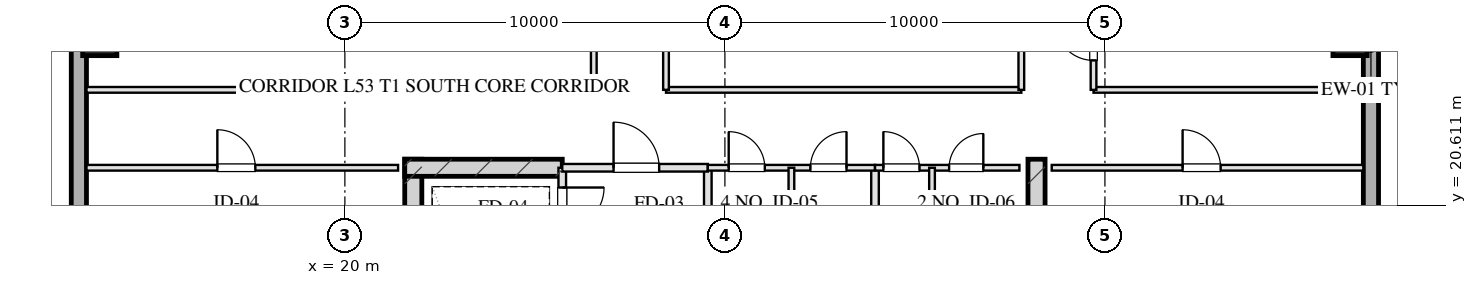
"""IFC4 building model, lengths in metres.
Left out: names, types, materials, properties, quantities, classifications, styles, units other than length and angle.
Written with IfcOpenShell. Run it as: python <this file> out.ifc"""

import sys

from ifc_helpers import new_model, si_unit, direction, frame, frame_2d, origin, origin_2d, place, context, subcontext, project, spatial, rectangle, hollow_rectangle, extrude, element, fill, save


model = new_model("IFC4")
c1 = context("Model", 3, precision=1e-05, world=origin(), true_north=direction((0.0, 1.0)))
c2 = subcontext(c1, "Body", "Model", "MODEL_VIEW")
j1 = project(units=[si_unit("LENGTHUNIT", "METRE"), si_unit("PLANEANGLEUNIT", "RADIAN")], contexts=[c1])
p1 = place(None, origin())
s1 = spatial("IfcSite", under=j1, at=p1, CompositionType="ELEMENT")
p2 = place(p1, origin())
s2 = spatial("IfcBuilding", under=s1, at=p2, CompositionType="ELEMENT")
p3 = place(p2, frame((0.0, 0.0, 198.95)))
s3 = spatial("IfcBuildingStorey", under=s2, at=p3, CompositionType="ELEMENT", Elevation=198.95)
for number, where, z_axis, x_axis in (
    (1, (21.8, 21.825, 0.0), (0.0, 0.0, 1.0), (0.0, -1.0, 0.0)),
    (2, (38.2, 21.825, 0.0), (0.0, 0.0, 1.0), (0.0, -1.0, 0.0)),
):
    element("IfcWall", number, at=place(p3, frame(where, z_axis=z_axis, x_axis=x_axis)), inside=s3, PredefinedType="SHEAR", context=c2, shape_type="SweptSolid", body=[
        extrude(rectangle(XDim=9.33, YDim=0.45, at=frame_2d((4.665, 0.0))), origin(), (0.0, 0.0, 1.0), 3.45),
    ])
p4 = place(p3, frame((21.575, 21.6, 0.0), z_axis=(0.0, 0.0, 1.0), x_axis=(1.0, 0.0, 0.0)))
e3 = element("IfcWall", 3, at=p4, inside=s3, PredefinedType="SHEAR", context=c2, shape_type="SweptSolid", body=[
    extrude(rectangle(XDim=4.145, YDim=0.45, at=frame_2d((2.073, 0.0))), origin(), (0.0, 0.0, 1.0), 3.45),
])
for number, where, z_axis, x_axis in (
    (4, (13.55, 25.0, 0.0), (0.0, 0.0, 1.0), (1.0, 0.0, 0.0)),
    (5, (46.45, 25.0, 0.0), (0.0, 0.0, 1.0), (1.0, 0.0, 0.0)),
):
    element("IfcColumn", number, at=place(p3, frame(where, z_axis=z_axis, x_axis=x_axis)), inside=s3, PredefinedType="COLUMN", context=c2, shape_type="SweptSolid", body=[
        extrude(hollow_rectangle(XDim=0.9, YDim=0.9, WallThickness=0.032, at=origin_2d()), origin(), (0.0, 0.0, 1.0), 3.451),
    ])
p5 = place(p3, frame((13.0, 10.8, 0.0), z_axis=(0.0, 0.0, 1.0), x_axis=(0.0, 1.0, 0.0)))
e6 = element("IfcWall", 6, at=p5, inside=s3, PredefinedType="SOLIDWALL", context=c2, shape_type="SweptSolid", body=[
    extrude(rectangle(XDim=46.4, YDim=0.4, at=frame_2d((23.2, 0.0))), origin(), (0.0, 0.0, 1.0), 2.61),
])
p6 = place(p5, frame((15.75, 0.0, 0.75)))
e7 = element("IfcOpeningElement", 7, at=p6, cuts=e6, PredefinedType="OPENING", context=c2, shape_type="SweptSolid", body=[
    extrude(rectangle(XDim=2.1, YDim=1.46, at=frame_2d((1.05, 0.73))), frame((0.0, 0.21, 0.0), z_axis=(0.0, -1.0, 0.0), x_axis=(1.0, 0.0, 0.0)), (0.0, 0.0, 1.0), 0.42),
])
p7 = place(p5, frame((19.55, 0.0, 0.75)))
e8 = element("IfcOpeningElement", 8, at=p7, cuts=e6, PredefinedType="OPENING", context=c2, shape_type="SweptSolid", body=[
    extrude(rectangle(XDim=2.1, YDim=1.46, at=frame_2d((1.05, 0.73))), frame((0.0, 0.21, 0.0), z_axis=(0.0, -1.0, 0.0), x_axis=(1.0, 0.0, 0.0)), (0.0, 0.0, 1.0), 0.42),
])
p8 = place(p5, frame((27.05, 0.0, 0.0)))
e9 = element("IfcOpeningElement", 9, at=p8, cuts=e6, PredefinedType="OPENING", context=c2, shape_type="SweptSolid", body=[
    extrude(rectangle(XDim=1.1, YDim=2.15, at=frame_2d((0.55, 1.075))), frame((0.0, 0.21, 0.0), z_axis=(0.0, -1.0, 0.0), x_axis=(1.0, 0.0, 0.0)), (0.0, 0.0, 1.0), 0.42),
])
p9 = place(p3, frame((47.0, 57.2, 0.0), z_axis=(0.0, 0.0, 1.0), x_axis=(0.0, -1.0, 0.0)))
e10 = element("IfcWall", 10, at=p9, inside=s3, PredefinedType="SOLIDWALL", context=c2, shape_type="SweptSolid", body=[
    extrude(rectangle(XDim=46.4, YDim=0.4, at=frame_2d((23.2, 0.0))), origin(), (0.0, 0.0, 1.0), 2.61),
])
p10 = place(p9, frame((28.55, 0.0, 0.75)))
e11 = element("IfcOpeningElement", 11, at=p10, cuts=e10, PredefinedType="OPENING", context=c2, shape_type="SweptSolid", body=[
    extrude(rectangle(XDim=2.1, YDim=1.46, at=frame_2d((1.05, 0.73))), frame((0.0, 0.21, 0.0), z_axis=(0.0, -1.0, 0.0), x_axis=(1.0, 0.0, 0.0)), (0.0, 0.0, 1.0), 0.42),
])
p11 = place(p9, frame((24.75, 0.0, 0.75)))
e12 = element("IfcOpeningElement", 12, at=p11, cuts=e10, PredefinedType="OPENING", context=c2, shape_type="SweptSolid", body=[
    extrude(rectangle(XDim=2.1, YDim=1.46, at=frame_2d((1.05, 0.73))), frame((0.0, 0.21, 0.0), z_axis=(0.0, -1.0, 0.0), x_axis=(1.0, 0.0, 0.0)), (0.0, 0.0, 1.0), 0.42),
])
p12 = place(p9, frame((16.667, 0.0, 0.0)))
e13 = element("IfcOpeningElement", 13, at=p12, cuts=e10, PredefinedType="OPENING", context=c2, shape_type="SweptSolid", body=[
    extrude(rectangle(XDim=1.1, YDim=2.15, at=frame_2d((0.55, 1.075))), frame((0.0, 0.21, 0.0), z_axis=(0.0, -1.0, 0.0), x_axis=(1.0, 0.0, 0.0)), (0.0, 0.0, 1.0), 0.42),
])
p13 = place(p3, frame((25.72, 21.6, 0.0), z_axis=(0.0, 0.0, 1.0), x_axis=(0.0, -1.0, 0.0)))
e14 = element("IfcWall", 14, at=p13, inside=s3, PredefinedType="PARTITIONING", context=c2, shape_type="SweptSolid", body=[
    extrude(rectangle(XDim=1.9, YDim=0.2, at=frame_2d((0.95, 0.0))), origin(), (0.0, 0.0, 1.0), 3.175),
])
p14 = place(p13, frame((0.52, 0.0, 0.0)))
e15 = element("IfcOpeningElement", 15, at=p14, cuts=e14, PredefinedType="OPENING", context=c2, shape_type="SweptSolid", body=[
    extrude(rectangle(XDim=1.1, YDim=2.05, at=frame_2d((0.55, 1.025))), frame((0.0, 0.11, 0.0), z_axis=(0.0, -1.0, 0.0), x_axis=(1.0, 0.0, 0.0)), (0.0, 0.0, 1.0), 0.22),
])
p15 = place(p3, frame((29.55, 21.6, 0.0), z_axis=(0.0, 0.0, 1.0), x_axis=(0.0, -1.0, 0.0)))
e16 = element("IfcWall", 16, at=p15, inside=s3, PredefinedType="PARTITIONING", context=c2, shape_type="SweptSolid", body=[
    extrude(rectangle(XDim=8.43, YDim=0.2, at=frame_2d((4.215, 0.0))), origin(), (0.0, 0.0, 1.0), 3.175),
])
p16 = place(p3, frame((25.72, 21.6, 0.0), z_axis=(0.0, 0.0, 1.0), x_axis=(1.0, 0.0, 0.0)))
e17 = element("IfcWall", 17, at=p16, inside=s3, PredefinedType="PARTITIONING", context=c2, shape_type="SweptSolid", body=[
    extrude(rectangle(XDim=3.83, YDim=0.2, at=frame_2d((1.915, 0.0))), origin(), (0.0, 0.0, 1.0), 3.175),
])
p17 = place(p16, frame((1.35, 0.0, 0.0)))
e18 = element("IfcOpeningElement", 18, at=p17, cuts=e17, PredefinedType="OPENING", context=c2, shape_type="SweptSolid", body=[
    extrude(rectangle(XDim=1.2, YDim=2.05, at=frame_2d((0.6, 1.025))), frame((0.0, 0.11, 0.0), z_axis=(0.0, -1.0, 0.0), x_axis=(1.0, 0.0, 0.0)), (0.0, 0.0, 1.0), 0.22),
])
p18 = place(p3, frame((33.95, 21.6, 0.0), z_axis=(0.0, 0.0, 1.0), x_axis=(0.0, -1.0, 0.0)))
e19 = element("IfcWall", 19, at=p18, inside=s3, PredefinedType="PARTITIONING", context=c2, shape_type="SweptSolid", body=[
    extrude(rectangle(XDim=8.43, YDim=0.2, at=frame_2d((4.215, 0.0))), origin(), (0.0, 0.0, 1.0), 3.175),
])
p19 = place(p3, frame((29.55, 21.6, 0.0), z_axis=(0.0, 0.0, 1.0), x_axis=(1.0, 0.0, 0.0)))
e20 = element("IfcWall", 20, at=p19, inside=s3, PredefinedType="PARTITIONING", context=c2, shape_type="SweptSolid", body=[
    extrude(rectangle(XDim=4.4, YDim=0.15, at=frame_2d((2.2, 0.0))), origin(), (0.0, 0.0, 1.0), 3.175),
])
p20 = place(p19, frame((0.55, 0.0, 0.0)))
e21 = element("IfcOpeningElement", 21, at=p20, cuts=e20, PredefinedType="OPENING", context=c2, shape_type="SweptSolid", body=[
    extrude(rectangle(XDim=0.95, YDim=2.05, at=frame_2d((0.475, 1.025))), frame((0.0, 0.085, 0.0), z_axis=(0.0, -1.0, 0.0), x_axis=(1.0, 0.0, 0.0)), (0.0, 0.0, 1.0), 0.17),
])
p21 = place(p19, frame((2.7, 0.0, 0.0)))
e22 = element("IfcOpeningElement", 22, at=p21, cuts=e20, PredefinedType="OPENING", context=c2, shape_type="SweptSolid", body=[
    extrude(rectangle(XDim=0.95, YDim=2.05, at=frame_2d((0.475, 1.025))), frame((0.0, 0.085, 0.0), z_axis=(0.0, -1.0, 0.0), x_axis=(1.0, 0.0, 0.0)), (0.0, 0.0, 1.0), 0.17),
])
p22 = place(p3, frame((31.75, 21.6, 0.0), z_axis=(0.0, 0.0, 1.0), x_axis=(0.0, -1.0, 0.0)))
e23 = element("IfcWall", 23, at=p22, inside=s3, PredefinedType="PARTITIONING", context=c2, shape_type="SweptSolid", body=[
    extrude(rectangle(XDim=8.43, YDim=0.15, at=frame_2d((4.215, 0.0))), origin(), (0.0, 0.0, 1.0), 3.175),
])
p23 = place(p3, frame((33.95, 21.6, 0.0), z_axis=(0.0, 0.0, 1.0), x_axis=(1.0, 0.0, 0.0)))
e24 = element("IfcWall", 24, at=p23, inside=s3, PredefinedType="PARTITIONING", context=c2, shape_type="SweptSolid", body=[
    extrude(rectangle(XDim=3.8, YDim=0.15, at=frame_2d((1.9, 0.0))), origin(), (0.0, 0.0, 1.0), 3.175),
])
p24 = place(p23, frame((0.22, 0.0, 0.0)))
e25 = element("IfcOpeningElement", 25, at=p24, cuts=e24, PredefinedType="OPENING", context=c2, shape_type="SweptSolid", body=[
    extrude(rectangle(XDim=0.95, YDim=2.05, at=frame_2d((0.475, 1.025))), frame((0.0, 0.085, 0.0), z_axis=(0.0, -1.0, 0.0), x_axis=(1.0, 0.0, 0.0)), (0.0, 0.0, 1.0), 0.17),
])
p25 = place(p23, frame((1.95, 0.0, 0.0)))
e26 = element("IfcOpeningElement", 26, at=p25, cuts=e24, PredefinedType="OPENING", context=c2, shape_type="SweptSolid", body=[
    extrude(rectangle(XDim=0.9, YDim=2.05, at=frame_2d((0.45, 1.025))), frame((0.0, 0.085, 0.0), z_axis=(0.0, -1.0, 0.0), x_axis=(1.0, 0.0, 0.0)), (0.0, 0.0, 1.0), 0.17),
])
p26 = place(p3, frame((35.45, 21.6, 0.0), z_axis=(0.0, 0.0, 1.0), x_axis=(0.0, -1.0, 0.0)))
e27 = element("IfcWall", 27, at=p26, inside=s3, PredefinedType="PARTITIONING", context=c2, shape_type="SweptSolid", body=[
    extrude(rectangle(XDim=8.43, YDim=0.15, at=frame_2d((4.215, 0.0))), origin(), (0.0, 0.0, 1.0), 2.815),
])
p27 = place(p26, frame((2.55, 0.0, 0.0)))
e28 = element("IfcOpeningElement", 28, at=p27, cuts=e27, PredefinedType="OPENING", context=c2, shape_type="SweptSolid", body=[
    extrude(rectangle(XDim=0.95, YDim=2.05, at=frame_2d((0.475, 1.025))), frame((0.0, 0.085, 0.0), z_axis=(0.0, -1.0, 0.0), x_axis=(1.0, 0.0, 0.0)), (0.0, 0.0, 1.0), 0.17),
])
p28 = place(p26, frame((5.6, 0.0, 0.0)))
e29 = element("IfcOpeningElement", 29, at=p28, cuts=e27, PredefinedType="OPENING", context=c2, shape_type="SweptSolid", body=[
    extrude(rectangle(XDim=0.9, YDim=2.05, at=frame_2d((0.45, 1.025))), frame((0.0, 0.085, 0.0), z_axis=(0.0, -1.0, 0.0), x_axis=(1.0, 0.0, 0.0)), (0.0, 0.0, 1.0), 0.17),
])
p29 = place(p3, frame((13.2, 21.6, 0.0), z_axis=(0.0, 0.0, 1.0), x_axis=(1.0, 0.0, 0.0)))
e30 = element("IfcWall", 30, at=p29, inside=s3, PredefinedType="PARTITIONING", context=c2, shape_type="SweptSolid", body=[
    extrude(rectangle(XDim=8.2, YDim=0.15, at=frame_2d((4.1, 0.0))), origin(), (0.0, 0.0, 1.0), 3.175),
])
p30 = place(p29, frame((3.444, 0.0, 0.0)))
e31 = element("IfcOpeningElement", 31, at=p30, cuts=e30, PredefinedType="OPENING", context=c2, shape_type="SweptSolid", body=[
    extrude(rectangle(XDim=1.0, YDim=2.05, at=frame_2d((0.5, 1.025))), frame((0.0, 0.085, 0.0), z_axis=(0.0, -1.0, 0.0), x_axis=(1.0, 0.0, 0.0)), (0.0, 0.0, 1.0), 0.17),
])
p31 = place(p3, frame((38.6, 21.6, 0.0), z_axis=(0.0, 0.0, 1.0), x_axis=(1.0, 0.0, 0.0)))
e32 = element("IfcWall", 32, at=p31, inside=s3, PredefinedType="PARTITIONING", context=c2, shape_type="SweptSolid", body=[
    extrude(rectangle(XDim=8.2, YDim=0.15, at=frame_2d((4.1, 0.0))), origin(), (0.0, 0.0, 1.0), 3.175),
])
p32 = place(p31, frame((3.444, 0.0, 0.0)))
e33 = element("IfcOpeningElement", 33, at=p32, cuts=e32, PredefinedType="OPENING", context=c2, shape_type="SweptSolid", body=[
    extrude(rectangle(XDim=1.0, YDim=2.05, at=frame_2d((0.5, 1.025))), frame((0.0, 0.085, 0.0), z_axis=(0.0, -1.0, 0.0), x_axis=(1.0, 0.0, 0.0)), (0.0, 0.0, 1.0), 0.17),
])
p33 = place(p3, frame((13.2, 23.65, 0.0), z_axis=(0.0, 0.0, 1.0), x_axis=(1.0, 0.0, 0.0)))
e34 = element("IfcWall", 34, at=p33, inside=s3, PredefinedType="PARTITIONING", context=c2, shape_type="SweptSolid", body=[
    extrude(rectangle(XDim=13.35, YDim=0.15, at=frame_2d((6.675, 0.0))), origin(), (0.0, 0.0, 1.0), 3.175),
])
p34 = place(p3, frame((28.45, 23.65, 0.0), z_axis=(0.0, 0.0, 1.0), x_axis=(1.0, 0.0, 0.0)))
e35 = element("IfcWall", 35, at=p34, inside=s3, PredefinedType="PARTITIONING", context=c2, shape_type="SweptSolid", body=[
    extrude(rectangle(XDim=9.35, YDim=0.15, at=frame_2d((4.675, 0.0))), origin(), (0.0, 0.0, 1.0), 3.175),
])
p35 = place(p3, frame((39.7, 23.65, 0.0), z_axis=(0.0, 0.0, 1.0), x_axis=(1.0, 0.0, 0.0)))
e36 = element("IfcWall", 36, at=p35, inside=s3, PredefinedType="PARTITIONING", context=c2, shape_type="SweptSolid", body=[
    extrude(rectangle(XDim=7.1, YDim=0.15, at=frame_2d((3.55, 0.0))), origin(), (0.0, 0.0, 1.0), 3.175),
])
p36 = place(p3, frame((26.55, 23.65, 0.0), z_axis=(0.0, 0.0, 1.0), x_axis=(0.0, 1.0, 0.0)))
e37 = element("IfcWall", 37, at=p36, inside=s3, PredefinedType="PARTITIONING", context=c2, shape_type="SweptSolid", body=[
    extrude(rectangle(XDim=20.7, YDim=0.15, at=frame_2d((10.35, 0.0))), origin(), (0.0, 0.0, 1.0), 3.175),
])
p37 = place(p36, frame((4.075, 0.0, 0.0)))
e38 = element("IfcOpeningElement", 38, at=p37, cuts=e37, PredefinedType="OPENING", context=c2, shape_type="SweptSolid", body=[
    extrude(rectangle(XDim=1.0, YDim=2.05, at=frame_2d((0.5, 1.025))), frame((0.0, 0.085, 0.0), z_axis=(0.0, -1.0, 0.0), x_axis=(1.0, 0.0, 0.0)), (0.0, 0.0, 1.0), 0.17),
])
p38 = place(p36, frame((14.425, 0.0, 0.0)))
e39 = element("IfcOpeningElement", 39, at=p38, cuts=e37, PredefinedType="OPENING", context=c2, shape_type="SweptSolid", body=[
    extrude(rectangle(XDim=1.0, YDim=2.05, at=frame_2d((0.5, 1.025))), frame((0.0, 0.085, 0.0), z_axis=(0.0, -1.0, 0.0), x_axis=(1.0, 0.0, 0.0)), (0.0, 0.0, 1.0), 0.17),
])
p39 = place(p3, frame((28.45, 23.65, 0.0), z_axis=(0.0, 0.0, 1.0), x_axis=(0.0, 1.0, 0.0)))
e40 = element("IfcWall", 40, at=p39, inside=s3, PredefinedType="PARTITIONING", context=c2, shape_type="SweptSolid", body=[
    extrude(rectangle(XDim=20.7, YDim=0.15, at=frame_2d((10.35, 0.0))), origin(), (0.0, 0.0, 1.0), 3.175),
])
p40 = place(p39, frame((9.936, 0.0, 0.0)))
e41 = element("IfcOpeningElement", 41, at=p40, cuts=e40, PredefinedType="OPENING", context=c2, shape_type="SweptSolid", body=[
    extrude(rectangle(XDim=1.1, YDim=2.05, at=frame_2d((0.55, 1.025))), frame((0.0, 0.085, 0.0), z_axis=(0.0, -1.0, 0.0), x_axis=(1.0, 0.0, 0.0)), (0.0, 0.0, 1.0), 0.17),
])
p41 = place(p3, frame((37.8, 23.65, 0.0), z_axis=(0.0, 0.0, 1.0), x_axis=(0.0, 1.0, 0.0)))
e42 = element("IfcWall", 42, at=p41, inside=s3, PredefinedType="PARTITIONING", context=c2, shape_type="SweptSolid", body=[
    extrude(rectangle(XDim=20.7, YDim=0.15, at=frame_2d((10.35, 0.0))), origin(), (0.0, 0.0, 1.0), 3.175),
])
p42 = place(p3, frame((39.7, 23.65, 0.0), z_axis=(0.0, 0.0, 1.0), x_axis=(0.0, 1.0, 0.0)))
e43 = element("IfcWall", 43, at=p42, inside=s3, PredefinedType="PARTITIONING", context=c2, shape_type="SweptSolid", body=[
    extrude(rectangle(XDim=20.7, YDim=0.15, at=frame_2d((10.35, 0.0))), origin(), (0.0, 0.0, 1.0), 3.175),
])
p43 = place(p42, frame((0.775, 0.0, 0.0)))
e44 = element("IfcOpeningElement", 44, at=p43, cuts=e43, PredefinedType="OPENING", context=c2, shape_type="SweptSolid", body=[
    extrude(rectangle(XDim=1.0, YDim=2.05, at=frame_2d((0.5, 1.025))), frame((0.0, 0.085, 0.0), z_axis=(0.0, -1.0, 0.0), x_axis=(1.0, 0.0, 0.0)), (0.0, 0.0, 1.0), 0.17),
])
p44 = place(p42, frame((3.95, 0.0, 0.0)))
e45 = element("IfcOpeningElement", 45, at=p44, cuts=e43, PredefinedType="OPENING", context=c2, shape_type="SweptSolid", body=[
    extrude(rectangle(XDim=1.0, YDim=2.05, at=frame_2d((0.5, 1.025))), frame((0.0, 0.085, 0.0), z_axis=(0.0, -1.0, 0.0), x_axis=(1.0, 0.0, 0.0)), (0.0, 0.0, 1.0), 0.17),
])
p45 = place(p42, frame((8.19, 0.0, 0.0)))
e46 = element("IfcOpeningElement", 46, at=p45, cuts=e43, PredefinedType="OPENING", context=c2, shape_type="SweptSolid", body=[
    extrude(rectangle(XDim=0.85, YDim=2.05, at=frame_2d((0.425, 1.025))), frame((0.0, 0.085, 0.0), z_axis=(0.0, -1.0, 0.0), x_axis=(1.0, 0.0, 0.0)), (0.0, 0.0, 1.0), 0.17),
])
p46 = place(p42, frame((12.373, 0.0, 0.0)))
e47 = element("IfcOpeningElement", 47, at=p46, cuts=e43, PredefinedType="OPENING", context=c2, shape_type="SweptSolid", body=[
    extrude(rectangle(XDim=1.05, YDim=2.05, at=frame_2d((0.525, 1.025))), frame((0.0, 0.085, 0.0), z_axis=(0.0, -1.0, 0.0), x_axis=(1.0, 0.0, 0.0)), (0.0, 0.0, 1.0), 0.17),
])
p47 = place(p42, frame((15.933, 0.0, 0.0)))
e48 = element("IfcOpeningElement", 48, at=p47, cuts=e43, PredefinedType="OPENING", context=c2, shape_type="SweptSolid", body=[
    extrude(rectangle(XDim=1.0, YDim=2.05, at=frame_2d((0.5, 1.025))), frame((0.0, 0.085, 0.0), z_axis=(0.0, -1.0, 0.0), x_axis=(1.0, 0.0, 0.0)), (0.0, 0.0, 1.0), 0.17),
])
p48 = place(p42, frame((18.925, 0.0, 0.0)))
e49 = element("IfcOpeningElement", 49, at=p48, cuts=e43, PredefinedType="OPENING", context=c2, shape_type="SweptSolid", body=[
    extrude(rectangle(XDim=1.0, YDim=2.05, at=frame_2d((0.5, 1.025))), frame((0.0, 0.085, 0.0), z_axis=(0.0, -1.0, 0.0), x_axis=(1.0, 0.0, 0.0)), (0.0, 0.0, 1.0), 0.17),
])
p49 = place(p14, origin())
e50 = element("IfcDoor", 50, at=p49, inside=s3, OperationType="SINGLE_SWING_LEFT", PredefinedType="DOOR", context=c2, shape_type="SweptSolid", body=[
    extrude(rectangle(XDim=1.1, YDim=2.05, at=frame_2d((0.55, 1.025))), frame((0.0, 0.025, 0.0), z_axis=(0.0, -1.0, 0.0), x_axis=(1.0, 0.0, 0.0)), (0.0, 0.0, 1.0), 0.05),
])
fill(e15, e50)
p50 = place(p17, origin())
e51 = element("IfcDoor", 51, at=p50, inside=s3, OperationType="SINGLE_SWING_LEFT", PredefinedType="DOOR", context=c2, shape_type="SweptSolid", body=[
    extrude(rectangle(XDim=1.2, YDim=2.05, at=frame_2d((0.6, 1.025))), frame((0.0, 0.025, 0.0), z_axis=(0.0, -1.0, 0.0), x_axis=(1.0, 0.0, 0.0)), (0.0, 0.0, 1.0), 0.05),
])
fill(e18, e51)
p51 = place(p20, origin())
e52 = element("IfcDoor", 52, at=p51, inside=s3, OperationType="SINGLE_SWING_LEFT", PredefinedType="DOOR", context=c2, shape_type="SweptSolid", body=[
    extrude(rectangle(XDim=0.95, YDim=2.05, at=frame_2d((0.475, 1.025))), frame((0.0, 0.025, 0.0), z_axis=(0.0, -1.0, 0.0), x_axis=(1.0, 0.0, 0.0)), (0.0, 0.0, 1.0), 0.05),
])
fill(e21, e52)
p52 = place(p21, origin())
e53 = element("IfcDoor", 53, at=p52, inside=s3, OperationType="SINGLE_SWING_RIGHT", PredefinedType="DOOR", context=c2, shape_type="SweptSolid", body=[
    extrude(rectangle(XDim=0.95, YDim=2.05, at=frame_2d((0.475, 1.025))), frame((0.0, 0.025, 0.0), z_axis=(0.0, -1.0, 0.0), x_axis=(1.0, 0.0, 0.0)), (0.0, 0.0, 1.0), 0.05),
])
fill(e22, e53)
p53 = place(p24, origin())
e54 = element("IfcDoor", 54, at=p53, inside=s3, OperationType="SINGLE_SWING_LEFT", PredefinedType="DOOR", context=c2, shape_type="SweptSolid", body=[
    extrude(rectangle(XDim=0.95, YDim=2.05, at=frame_2d((0.475, 1.025))), frame((0.0, 0.025, 0.0), z_axis=(0.0, -1.0, 0.0), x_axis=(1.0, 0.0, 0.0)), (0.0, 0.0, 1.0), 0.05),
])
fill(e25, e54)
p54 = place(p25, origin())
e55 = element("IfcDoor", 55, at=p54, inside=s3, OperationType="SINGLE_SWING_RIGHT", PredefinedType="DOOR", context=c2, shape_type="SweptSolid", body=[
    extrude(rectangle(XDim=0.9, YDim=2.05, at=frame_2d((0.45, 1.025))), frame((0.0, 0.025, 0.0), z_axis=(0.0, -1.0, 0.0), x_axis=(1.0, 0.0, 0.0)), (0.0, 0.0, 1.0), 0.05),
])
fill(e26, e55)
p55 = place(p30, origin())
e56 = element("IfcDoor", 56, at=p55, inside=s3, OperationType="SINGLE_SWING_LEFT", PredefinedType="DOOR", context=c2, shape_type="SweptSolid", body=[
    extrude(rectangle(XDim=1.0, YDim=2.05, at=frame_2d((0.5, 1.025))), frame((0.0, 0.025, 0.0), z_axis=(0.0, -1.0, 0.0), x_axis=(1.0, 0.0, 0.0)), (0.0, 0.0, 1.0), 0.05),
])
fill(e31, e56)
p56 = place(p32, origin())
e57 = element("IfcDoor", 57, at=p56, inside=s3, OperationType="SINGLE_SWING_LEFT", PredefinedType="DOOR", context=c2, shape_type="SweptSolid", body=[
    extrude(rectangle(XDim=1.0, YDim=2.05, at=frame_2d((0.5, 1.025))), frame((0.0, 0.025, 0.0), z_axis=(0.0, -1.0, 0.0), x_axis=(1.0, 0.0, 0.0)), (0.0, 0.0, 1.0), 0.05),
])
fill(e33, e57)
p57 = place(p43, origin())
e58 = element("IfcDoor", 58, at=p57, inside=s3, OperationType="SINGLE_SWING_RIGHT", PredefinedType="DOOR", context=c2, shape_type="SweptSolid", body=[
    extrude(rectangle(XDim=1.0, YDim=2.05, at=frame_2d((0.5, 1.025))), frame((0.0, 0.025, 0.0), z_axis=(0.0, -1.0, 0.0), x_axis=(1.0, 0.0, 0.0)), (0.0, 0.0, 1.0), 0.05),
])
fill(e44, e58)
save(model, sys.argv[1])
